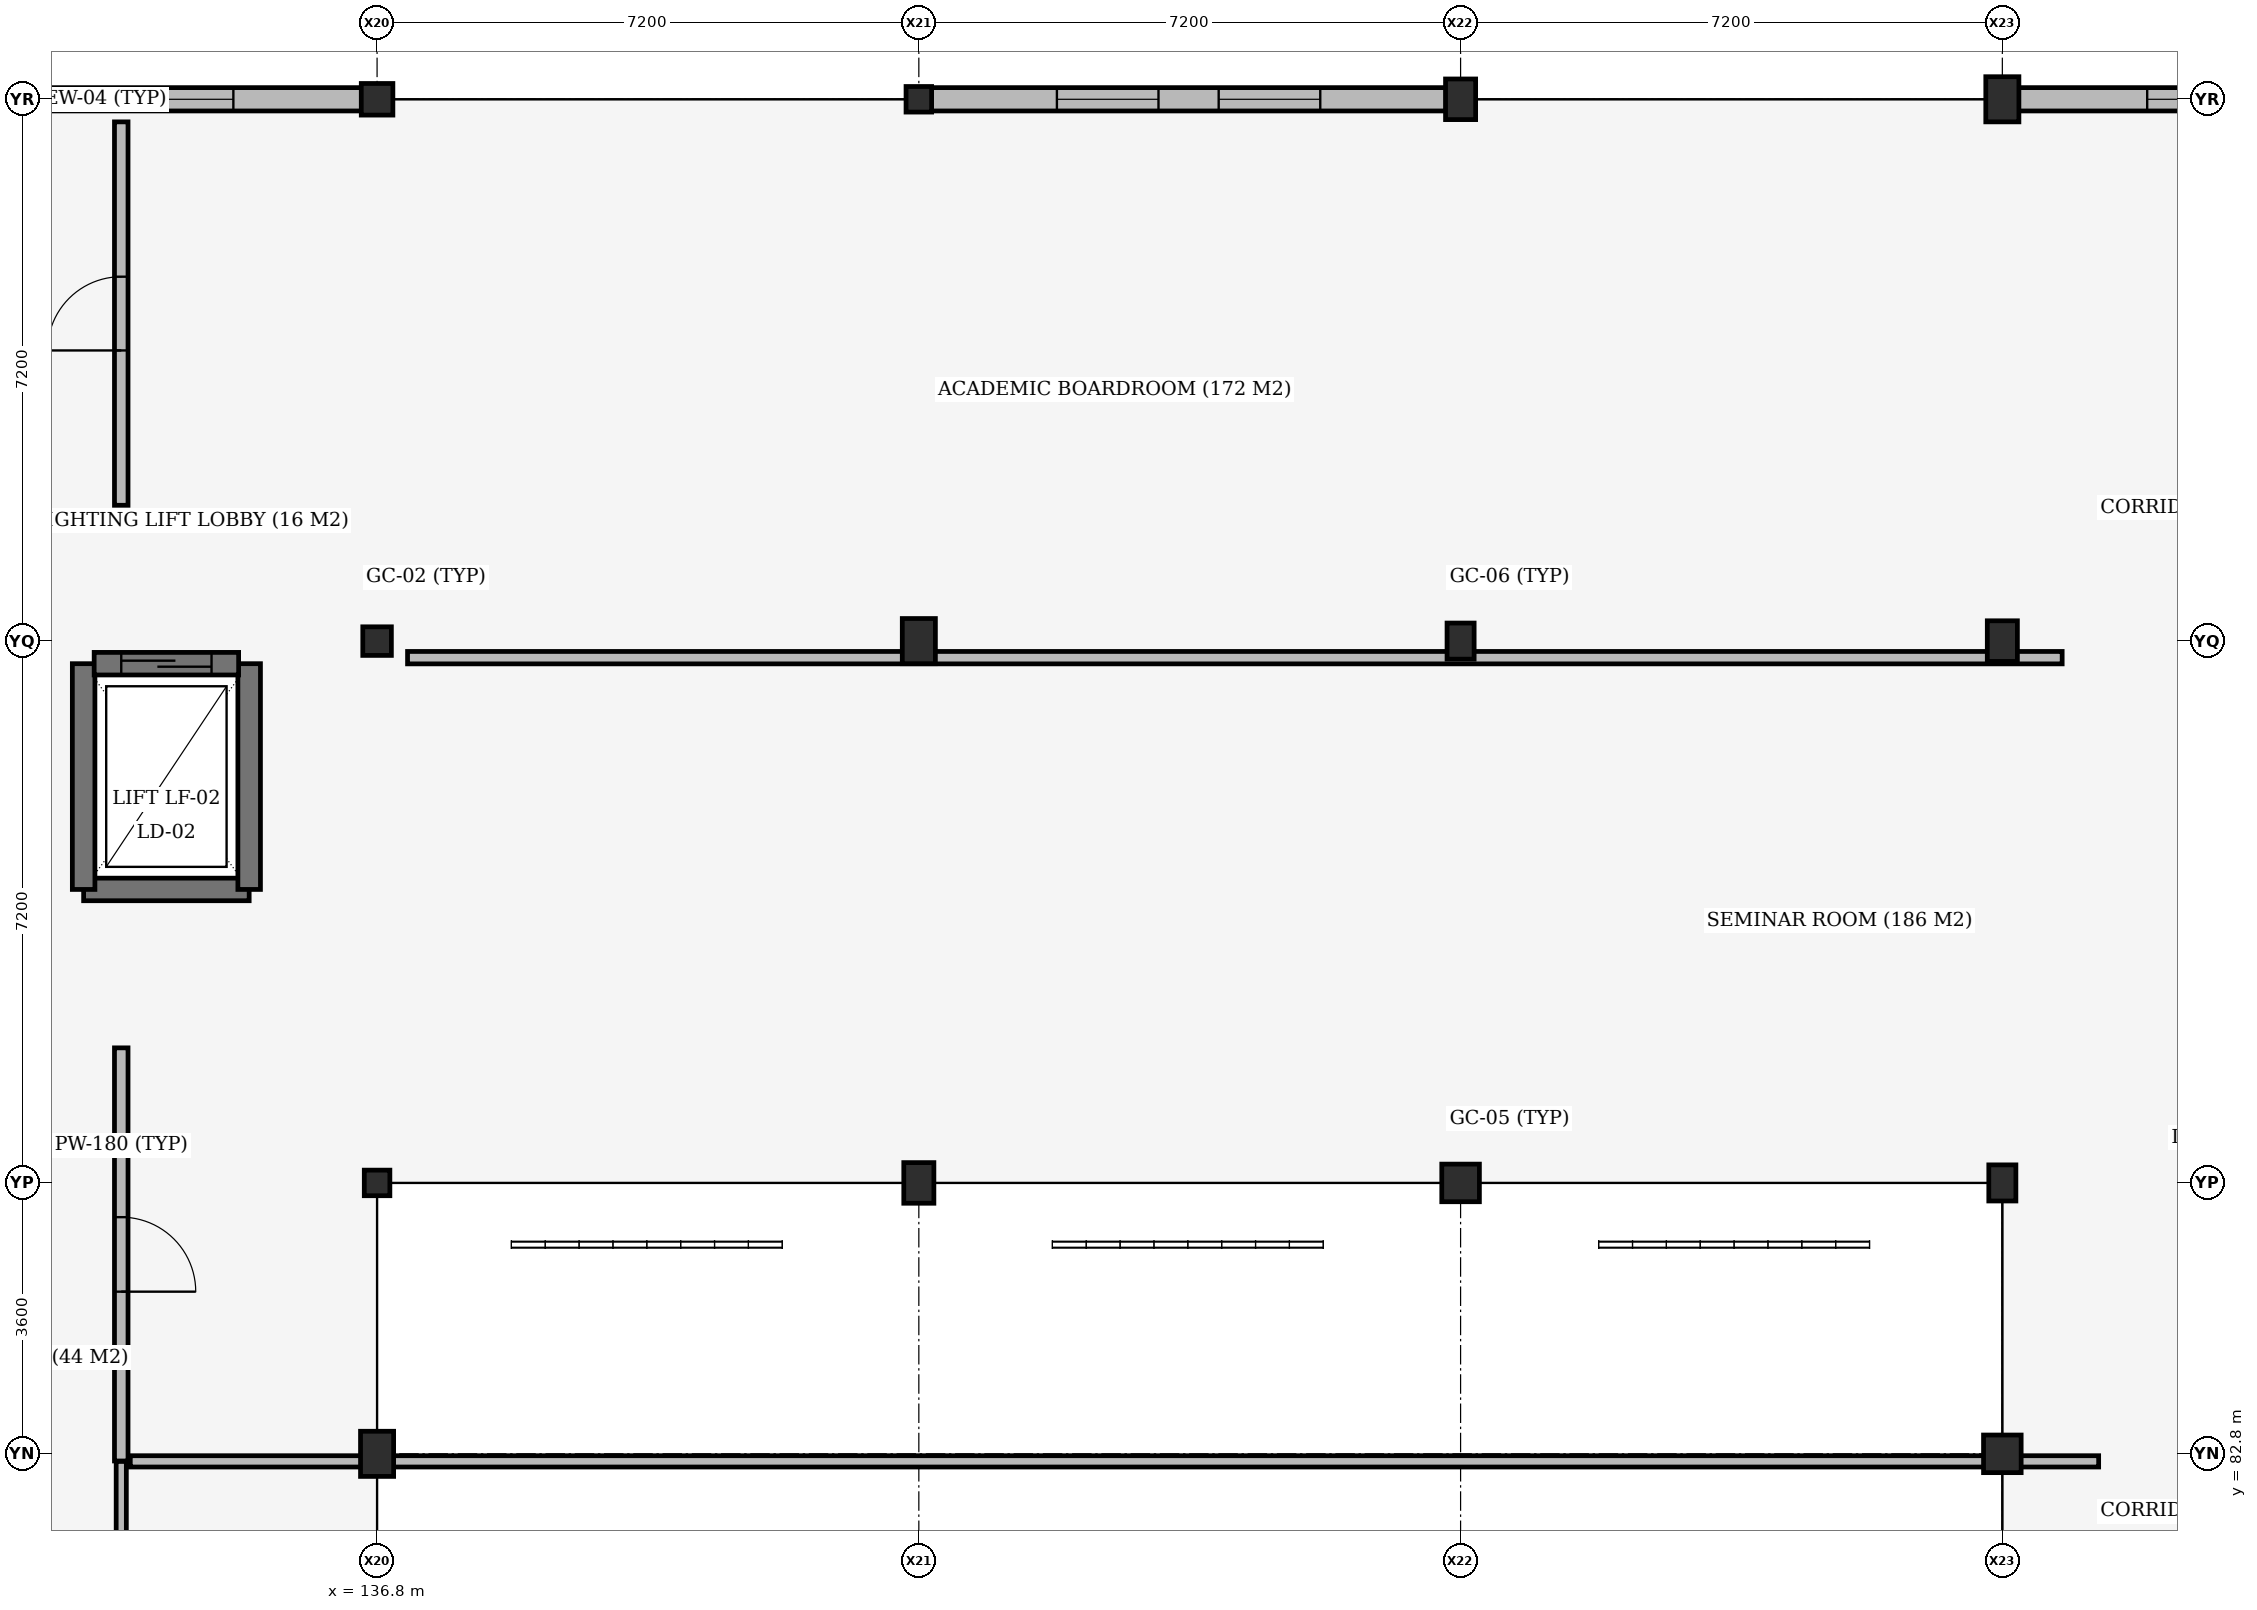
"""IFC4 building model, lengths in metres.
Left out: names, types, materials, properties, quantities, classifications, styles, units other than length and angle.
Written with IfcOpenShell. Run it as: python <this file> out.ifc"""

import sys

from ifc_helpers import new_model, si_unit, direction, frame, frame_2d, origin, origin_2d, place, context, subcontext, project, spatial, rectangle, extrude, element, fill, save


model = new_model("IFC4")
c1 = context("Model", 3, precision=1e-05, world=origin(), true_north=direction((0.0, 1.0)))
c2 = subcontext(c1, "Body", "Model", "MODEL_VIEW")
j1 = project(units=[si_unit("LENGTHUNIT", "METRE"), si_unit("PLANEANGLEUNIT", "RADIAN")], contexts=[c1])
p1 = place(None, origin())
s1 = spatial("IfcSite", under=j1, at=p1, CompositionType="ELEMENT")
p2 = place(p1, origin())
s2 = spatial("IfcBuilding", under=s1, at=p2, CompositionType="ELEMENT")
p3 = place(p2, frame((0.0, 0.0, 13.8)))
s3 = spatial("IfcBuildingStorey", under=s2, at=p3, CompositionType="ELEMENT", Elevation=13.8)
p4 = place(p3, frame((136.8, 82.8, 0.0), z_axis=(0.0, 0.0, 1.0), x_axis=(1.0, 0.0, 0.0)))
e1 = element("IfcColumn", 1, at=p4, inside=s3, PredefinedType="COLUMN", context=c2, shape_type="SweptSolid", body=[
    extrude(rectangle(XDim=0.44, YDim=0.6, at=origin_2d()), origin(), (0.0, 0.0, 1.0), 3.935),
])
p5 = place(p3, frame((136.8, 86.4, 0.0), z_axis=(0.0, 0.0, 1.0), x_axis=(1.0, 0.0, 0.0)))
e2 = element("IfcColumn", 2, at=p5, inside=s3, PredefinedType="COLUMN", context=c2, shape_type="SweptSolid", body=[
    extrude(rectangle(XDim=0.34, YDim=0.34, at=origin_2d()), origin(), (0.0, 0.0, 1.0), 3.935),
])
p6 = place(p3, frame((136.8, 93.6, 0.0), z_axis=(0.0, 0.0, 1.0), x_axis=(1.0, 0.0, 0.0)))
e3 = element("IfcColumn", 3, at=p6, inside=s3, PredefinedType="COLUMN", context=c2, shape_type="SweptSolid", body=[
    extrude(rectangle(XDim=0.38, YDim=0.38, at=origin_2d()), origin(), (0.0, 0.0, 1.0), 3.935),
])
p7 = place(p3, frame((136.8, 100.8, 0.0), z_axis=(0.0, 0.0, 1.0), x_axis=(1.0, 0.0, 0.0)))
e4 = element("IfcColumn", 4, at=p7, inside=s3, PredefinedType="COLUMN", context=c2, shape_type="SweptSolid", body=[
    extrude(rectangle(XDim=0.42, YDim=0.42, at=origin_2d()), origin(), (0.0, 0.0, 1.0), 3.935),
])
p8 = place(p3, frame((144.0, 86.4, 0.0), z_axis=(0.0, 0.0, 1.0), x_axis=(1.0, 0.0, 0.0)))
e5 = element("IfcColumn", 5, at=p8, inside=s3, PredefinedType="COLUMN", context=c2, shape_type="SweptSolid", body=[
    extrude(rectangle(XDim=0.4, YDim=0.54, at=origin_2d()), origin(), (0.0, 0.0, 1.0), 3.935),
])
p9 = place(p3, frame((144.0, 93.6, 0.0), z_axis=(0.0, 0.0, 1.0), x_axis=(1.0, 0.0, 0.0)))
e6 = element("IfcColumn", 6, at=p9, inside=s3, PredefinedType="COLUMN", context=c2, shape_type="SweptSolid", body=[
    extrude(rectangle(XDim=0.44, YDim=0.6, at=origin_2d()), origin(), (0.0, 0.0, 1.0), 3.935),
])
p10 = place(p3, frame((144.0, 100.8, 0.0), z_axis=(0.0, 0.0, 1.0), x_axis=(1.0, 0.0, 0.0)))
e7 = element("IfcColumn", 7, at=p10, inside=s3, PredefinedType="COLUMN", context=c2, shape_type="SweptSolid", body=[
    extrude(rectangle(XDim=0.34, YDim=0.34, at=origin_2d()), origin(), (0.0, 0.0, 1.0), 3.935),
])
p11 = place(p3, frame((151.2, 86.4, 0.0), z_axis=(0.0, 0.0, 1.0), x_axis=(1.0, 0.0, 0.0)))
e8 = element("IfcColumn", 8, at=p11, inside=s3, PredefinedType="COLUMN", context=c2, shape_type="SweptSolid", body=[
    extrude(rectangle(XDim=0.5, YDim=0.5, at=origin_2d()), origin(), (0.0, 0.0, 1.0), 3.935),
])
p12 = place(p3, frame((151.2, 93.6, 0.0), z_axis=(0.0, 0.0, 1.0), x_axis=(1.0, 0.0, 0.0)))
e9 = element("IfcColumn", 9, at=p12, inside=s3, PredefinedType="COLUMN", context=c2, shape_type="SweptSolid", body=[
    extrude(rectangle(XDim=0.36, YDim=0.48, at=origin_2d()), origin(), (0.0, 0.0, 1.0), 3.935),
])
p13 = place(p3, frame((151.2, 100.8, 0.0), z_axis=(0.0, 0.0, 1.0), x_axis=(1.0, 0.0, 0.0)))
e10 = element("IfcColumn", 10, at=p13, inside=s3, PredefinedType="COLUMN", context=c2, shape_type="SweptSolid", body=[
    extrude(rectangle(XDim=0.4, YDim=0.54, at=origin_2d()), origin(), (0.0, 0.0, 1.0), 3.935),
])
p14 = place(p3, frame((158.4, 82.8, 0.0), z_axis=(0.0, 0.0, 1.0), x_axis=(1.0, 0.0, 0.0)))
e11 = element("IfcColumn", 11, at=p14, inside=s3, PredefinedType="COLUMN", context=c2, shape_type="SweptSolid", body=[
    extrude(rectangle(XDim=0.5, YDim=0.5, at=origin_2d()), origin(), (0.0, 0.0, 1.0), 3.935),
])
p15 = place(p3, frame((158.4, 86.4, 0.0), z_axis=(0.0, 0.0, 1.0), x_axis=(1.0, 0.0, 0.0)))
e12 = element("IfcColumn", 12, at=p15, inside=s3, PredefinedType="COLUMN", context=c2, shape_type="SweptSolid", body=[
    extrude(rectangle(XDim=0.36, YDim=0.48, at=origin_2d()), origin(), (0.0, 0.0, 1.0), 3.935),
])
p16 = place(p3, frame((158.4, 93.6, 0.0), z_axis=(0.0, 0.0, 1.0), x_axis=(1.0, 0.0, 0.0)))
e13 = element("IfcColumn", 13, at=p16, inside=s3, PredefinedType="COLUMN", context=c2, shape_type="SweptSolid", body=[
    extrude(rectangle(XDim=0.4, YDim=0.54, at=origin_2d()), origin(), (0.0, 0.0, 1.0), 3.935),
])
p17 = place(p3, frame((158.4, 100.8, 0.0), z_axis=(0.0, 0.0, 1.0), x_axis=(1.0, 0.0, 0.0)))
e14 = element("IfcColumn", 14, at=p17, inside=s3, PredefinedType="COLUMN", context=c2, shape_type="SweptSolid", body=[
    extrude(rectangle(XDim=0.44, YDim=0.6, at=origin_2d()), origin(), (0.0, 0.0, 1.0), 3.935),
])
p18 = place(p3, frame((132.9, 90.3, 0.0), z_axis=(0.0, 0.0, 1.0), x_axis=(1.0, 0.0, 0.0)))
e15 = element("IfcWall", 15, at=p18, inside=s3, PredefinedType="SHEAR", context=c2, shape_type="SweptSolid", body=[
    extrude(rectangle(XDim=2.2, YDim=0.3, at=frame_2d((1.1, 0.0))), origin(), (0.0, 0.0, 1.0), 3.935),
])
for number, where, z_axis, x_axis in (
    (16, (132.9, 93.3, 0.0), (0.0, 0.0, 1.0), (0.0, -1.0, 0.0)),
    (17, (135.1, 90.3, 0.0), (0.0, 0.0, 1.0), (0.0, 1.0, 0.0)),
):
    element("IfcWall", number, at=place(p3, frame(where, z_axis=z_axis, x_axis=x_axis)), inside=s3, PredefinedType="SHEAR", context=c2, shape_type="SweptSolid", body=[
        extrude(rectangle(XDim=3.0, YDim=0.3, at=frame_2d((1.5, 0.0))), origin(), (0.0, 0.0, 1.0), 3.935),
    ])
p19 = place(p3, frame((129.782, 100.8, 0.0), z_axis=(0.0, 0.0, 1.0), x_axis=(1.0, 0.0, 0.0)))
e18 = element("IfcWall", 18, at=p19, inside=s3, PredefinedType="STANDARD", context=c2, shape_type="SweptSolid", body=[
    extrude(rectangle(XDim=6.816, YDim=0.31, at=frame_2d((3.408, 0.0))), origin(), (0.0, 0.0, 1.0), 3.195),
])
p20 = place(p19, frame((1.708, 0.0, 0.9)))
e19 = element("IfcOpeningElement", 19, at=p20, cuts=e18, PredefinedType="OPENING", context=c2, shape_type="SweptSolid", body=[
    extrude(rectangle(XDim=3.4, YDim=1.5, at=frame_2d((1.7, 0.75))), frame((0.0, 0.165, 0.0), z_axis=(0.0, -1.0, 0.0), x_axis=(1.0, 0.0, 0.0)), (0.0, 0.0, 1.0), 0.33),
])
p21 = place(p3, frame((144.162, 100.8, 0.0), z_axis=(0.0, 0.0, 1.0), x_axis=(1.0, 0.0, 0.0)))
e20 = element("IfcWall", 20, at=p21, inside=s3, PredefinedType="STANDARD", context=c2, shape_type="SweptSolid", body=[
    extrude(rectangle(XDim=6.846, YDim=0.31, at=frame_2d((3.423, 0.0))), origin(), (0.0, 0.0, 1.0), 3.355),
])
p22 = place(p21, frame((1.673, 0.0, 0.95)))
e21 = element("IfcOpeningElement", 21, at=p22, cuts=e20, PredefinedType="OPENING", context=c2, shape_type="SweptSolid", body=[
    extrude(rectangle(XDim=1.35, YDim=2.0, at=frame_2d((0.675, 1.0))), frame((0.0, 0.165, 0.0), z_axis=(0.0, -1.0, 0.0), x_axis=(1.0, 0.0, 0.0)), (0.0, 0.0, 1.0), 0.33),
])
p23 = place(p21, frame((3.823, 0.0, 0.95)))
e22 = element("IfcOpeningElement", 22, at=p23, cuts=e20, PredefinedType="OPENING", context=c2, shape_type="SweptSolid", body=[
    extrude(rectangle(XDim=1.35, YDim=2.0, at=frame_2d((0.675, 1.0))), frame((0.0, 0.165, 0.0), z_axis=(0.0, -1.0, 0.0), x_axis=(1.0, 0.0, 0.0)), (0.0, 0.0, 1.0), 0.33),
])
p24 = place(p3, frame((158.612, 100.8, 0.0), z_axis=(0.0, 0.0, 1.0), x_axis=(1.0, 0.0, 0.0)))
e23 = element("IfcWall", 23, at=p24, inside=s3, PredefinedType="STANDARD", context=c2, shape_type="SweptSolid", body=[
    extrude(rectangle(XDim=6.826, YDim=0.31, at=frame_2d((3.413, 0.0))), origin(), (0.0, 0.0, 1.0), 3.255),
])
p25 = place(p24, frame((1.713, 0.0, 0.9)))
e24 = element("IfcOpeningElement", 24, at=p25, cuts=e23, PredefinedType="OPENING", context=c2, shape_type="SweptSolid", body=[
    extrude(rectangle(XDim=3.4, YDim=1.5, at=frame_2d((1.7, 0.75))), frame((0.0, 0.165, 0.0), z_axis=(0.0, -1.0, 0.0), x_axis=(1.0, 0.0, 0.0)), (0.0, 0.0, 1.0), 0.33),
])
p26 = place(p3, frame((133.04, 93.3, 0.0), z_axis=(0.0, 0.0, 1.0), x_axis=(1.0, 0.0, 0.0)))
e25 = element("IfcWall", 25, at=p26, inside=s3, PredefinedType="SHEAR", context=c2, shape_type="SweptSolid", body=[
    extrude(rectangle(XDim=1.92, YDim=0.3, at=frame_2d((0.96, 0.0))), origin(), (0.0, 0.0, 1.0), 3.935),
])
p27 = place(p26, frame((0.36, 0.0, 0.0)))
e26 = element("IfcOpeningElement", 26, at=p27, cuts=e25, PredefinedType="OPENING", context=c2, shape_type="SweptSolid", body=[
    extrude(rectangle(XDim=1.2, YDim=2.1, at=frame_2d((0.6, 1.05))), frame((0.0, 0.16, 0.0), z_axis=(0.0, -1.0, 0.0), x_axis=(1.0, 0.0, 0.0)), (0.0, 0.0, 1.0), 0.32),
])
p28 = place(p3, frame((133.4, 74.055, 0.0), z_axis=(0.0, 0.0, 1.0), x_axis=(0.0, 1.0, 0.0)))
e27 = element("IfcWall", 27, at=p28, inside=s3, PredefinedType="PARTITIONING", context=c2, shape_type="SweptSolid", body=[
    extrude(rectangle(XDim=8.645, YDim=0.135, at=frame_2d((4.323, 0.0))), origin(), (0.0, 0.0, 1.0), 3.295),
])
p29 = place(p28, frame((3.748, 0.0, 0.0)))
e28 = element("IfcOpeningElement", 28, at=p29, cuts=e27, PredefinedType="OPENING", context=c2, shape_type="SweptSolid", body=[
    extrude(rectangle(XDim=1.15, YDim=2.2, at=frame_2d((0.575, 1.1))), frame((0.0, 0.077, 0.0), z_axis=(0.0, -1.0, 0.0), x_axis=(1.0, 0.0, 0.0)), (0.0, 0.0, 1.0), 0.155),
])
p30 = place(p3, frame((133.52, 82.7, 0.0), z_axis=(0.0, 0.0, 1.0), x_axis=(1.0, 0.0, 0.0)))
e29 = element("IfcWall", 29, at=p30, inside=s3, PredefinedType="PARTITIONING", context=c2, shape_type="SweptSolid", body=[
    extrude(rectangle(XDim=3.36, YDim=0.15, at=frame_2d((1.68, 0.0))), origin(), (0.0, 0.0, 1.0), 3.355),
])
p31 = place(p3, frame((133.4, 82.705, 0.0), z_axis=(0.0, 0.0, 1.0), x_axis=(0.0, 1.0, 0.0)))
e30 = element("IfcWall", 30, at=p31, inside=s3, PredefinedType="PARTITIONING", context=c2, shape_type="SweptSolid", body=[
    extrude(rectangle(XDim=5.49, YDim=0.18, at=frame_2d((2.745, 0.0))), origin(), (0.0, 0.0, 1.0), 3.355),
])
p32 = place(p31, frame((2.25, 0.0, 0.0)))
e31 = element("IfcOpeningElement", 31, at=p32, cuts=e30, PredefinedType="OPENING", context=c2, shape_type="SweptSolid", body=[
    extrude(rectangle(XDim=0.99, YDim=2.18, at=frame_2d((0.495, 1.09))), frame((0.0, 0.1, 0.0), z_axis=(0.0, -1.0, 0.0), x_axis=(1.0, 0.0, 0.0)), (0.0, 0.0, 1.0), 0.2),
])
p33 = place(p3, frame((136.885, 82.7, 0.0), z_axis=(0.0, 0.0, 1.0), x_axis=(1.0, 0.0, 0.0)))
e32 = element("IfcWall", 32, at=p33, inside=s3, PredefinedType="PARTITIONING", context=c2, shape_type="SweptSolid", body=[
    extrude(rectangle(XDim=22.795, YDim=0.15, at=frame_2d((11.397, 0.0))), origin(), (0.0, 0.0, 1.0), 3.195),
])
p34 = place(p3, frame((137.205, 93.38, 0.0), z_axis=(0.0, 0.0, 1.0), x_axis=(1.0, 0.0, 0.0)))
e33 = element("IfcWall", 33, at=p34, inside=s3, PredefinedType="PARTITIONING", context=c2, shape_type="SweptSolid", body=[
    extrude(rectangle(XDim=21.99, YDim=0.165, at=frame_2d((10.995, 0.0))), origin(), (0.0, 0.0, 1.0), 3.195),
])
p35 = place(p3, frame((133.4, 95.405, 0.0), z_axis=(0.0, 0.0, 1.0), x_axis=(0.0, 1.0, 0.0)))
e34 = element("IfcWall", 34, at=p35, inside=s3, PredefinedType="PARTITIONING", context=c2, shape_type="SweptSolid", body=[
    extrude(rectangle(XDim=5.095, YDim=0.18, at=frame_2d((2.547, 0.0))), origin(), (0.0, 0.0, 1.0), 3.935),
])
p36 = place(p35, frame((2.058, 0.0, 0.0)))
e35 = element("IfcOpeningElement", 35, at=p36, cuts=e34, PredefinedType="OPENING", context=c2, shape_type="SweptSolid", body=[
    extrude(rectangle(XDim=0.98, YDim=2.18, at=frame_2d((0.49, 1.09))), frame((0.0, 0.1, 0.0), z_axis=(0.0, -1.0, 0.0), x_axis=(1.0, 0.0, 0.0)), (0.0, 0.0, 1.0), 0.2),
])
p37 = place(p20, origin())
e36 = element("IfcWindow", 36, at=p37, inside=s3, PartitioningType="DOUBLE_PANEL_VERTICAL", PredefinedType="WINDOW", context=c2, shape_type="SweptSolid", body=[
    extrude(rectangle(XDim=3.4, YDim=1.5, at=frame_2d((1.7, 0.75))), frame((0.0, 0.03, 0.0), z_axis=(0.0, -1.0, 0.0), x_axis=(1.0, 0.0, 0.0)), (0.0, 0.0, 1.0), 0.06),
])
fill(e19, e36)
p38 = place(p22, origin())
e37 = element("IfcWindow", 37, at=p38, inside=s3, PartitioningType="DOUBLE_PANEL_VERTICAL", PredefinedType="WINDOW", context=c2, shape_type="SweptSolid", body=[
    extrude(rectangle(XDim=1.35, YDim=2.0, at=frame_2d((0.675, 1.0))), frame((0.0, 0.03, 0.0), z_axis=(0.0, -1.0, 0.0), x_axis=(1.0, 0.0, 0.0)), (0.0, 0.0, 1.0), 0.06),
])
fill(e21, e37)
p39 = place(p23, origin())
e38 = element("IfcWindow", 38, at=p39, inside=s3, PartitioningType="DOUBLE_PANEL_VERTICAL", PredefinedType="WINDOW", context=c2, shape_type="SweptSolid", body=[
    extrude(rectangle(XDim=1.35, YDim=2.0, at=frame_2d((0.675, 1.0))), frame((0.0, 0.03, 0.0), z_axis=(0.0, -1.0, 0.0), x_axis=(1.0, 0.0, 0.0)), (0.0, 0.0, 1.0), 0.06),
])
fill(e22, e38)
p40 = place(p25, origin())
e39 = element("IfcWindow", 39, at=p40, inside=s3, PartitioningType="DOUBLE_PANEL_VERTICAL", PredefinedType="WINDOW", context=c2, shape_type="SweptSolid", body=[
    extrude(rectangle(XDim=3.4, YDim=1.5, at=frame_2d((1.7, 0.75))), frame((0.0, 0.03, 0.0), z_axis=(0.0, -1.0, 0.0), x_axis=(1.0, 0.0, 0.0)), (0.0, 0.0, 1.0), 0.06),
])
fill(e24, e39)
p41 = place(p27, origin())
e40 = element("IfcDoor", 40, at=p41, inside=s3, OperationType="SLIDING_TO_LEFT", PredefinedType="DOOR", context=c2, shape_type="SweptSolid", body=[
    extrude(rectangle(XDim=1.2, YDim=2.1, at=frame_2d((0.6, 1.05))), frame((0.0, 0.025, 0.0), z_axis=(0.0, -1.0, 0.0), x_axis=(1.0, 0.0, 0.0)), (0.0, 0.0, 1.0), 0.05),
])
fill(e26, e40)
p42 = place(p32, origin())
e41 = element("IfcDoor", 41, at=p42, inside=s3, OperationType="SINGLE_SWING_RIGHT", PredefinedType="DOOR", context=c2, shape_type="SweptSolid", body=[
    extrude(rectangle(XDim=0.99, YDim=2.18, at=frame_2d((0.495, 1.09))), frame((0.0, 0.025, 0.0), z_axis=(0.0, -1.0, 0.0), x_axis=(1.0, 0.0, 0.0)), (0.0, 0.0, 1.0), 0.05),
])
fill(e31, e41)
p43 = place(p36, origin())
e42 = element("IfcDoor", 42, at=p43, inside=s3, OperationType="SINGLE_SWING_LEFT", PredefinedType="DOOR", context=c2, shape_type="SweptSolid", body=[
    extrude(rectangle(XDim=0.98, YDim=2.18, at=frame_2d((0.49, 1.09))), frame((0.0, 0.025, 0.0), z_axis=(0.0, -1.0, 0.0), x_axis=(1.0, 0.0, 0.0)), (0.0, 0.0, 1.0), 0.05),
])
fill(e35, e42)
save(model, sys.argv[1])
